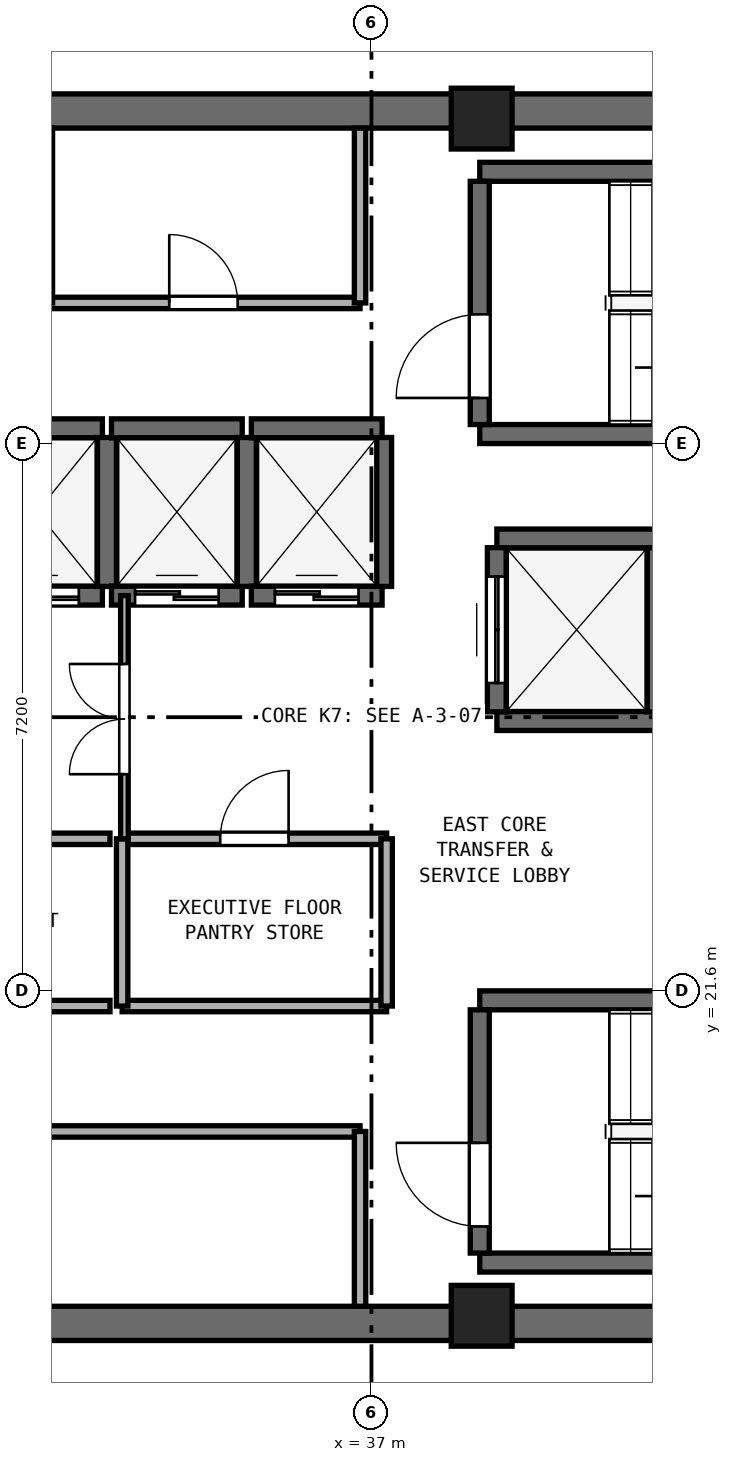
"""IFC4 building model, lengths in metres.
Left out: names, types, materials, properties, quantities, classifications, styles, units other than length and angle.
Written with IfcOpenShell. Run it as: python <this file> out.ifc"""

import sys

from ifc_helpers import new_model, si_unit, direction, frame, frame_2d, origin, origin_2d, place, context, subcontext, project, spatial, rectangle, extrude, element, fill, save


model = new_model("IFC4")
c1 = context("Model", 3, precision=1e-05, world=origin(), true_north=direction((0.0, 1.0)))
c2 = subcontext(c1, "Body", "Model", "MODEL_VIEW")
j1 = project(units=[si_unit("LENGTHUNIT", "METRE"), si_unit("PLANEANGLEUNIT", "RADIAN")], contexts=[c1])
p1 = place(None, origin())
s1 = spatial("IfcSite", under=j1, at=p1, CompositionType="ELEMENT")
p2 = place(p1, origin())
s2 = spatial("IfcBuilding", under=s1, at=p2, CompositionType="ELEMENT")
p3 = place(p2, frame((0.0, 0.0, 247.8)))
s3 = spatial("IfcBuildingStorey", under=s2, at=p3, CompositionType="ELEMENT", Elevation=247.8)
for number, where, z_axis, x_axis in (
    (1, (25.4, 17.225, 0.0), (0.0, 0.0, 1.0), (1.0, 0.0, 0.0)),
    (2, (25.4, 33.175, 0.0), (0.0, 0.0, 1.0), (1.0, 0.0, 0.0)),
):
    element("IfcWall", number, at=place(p3, frame(where, z_axis=z_axis, x_axis=x_axis)), inside=s3, PredefinedType="SHEAR", context=c2, shape_type="SweptSolid", body=[
        extrude(rectangle(XDim=23.2, YDim=0.45, at=frame_2d((11.6, 0.0))), origin(), (0.0, 0.0, 1.0), 3.51),
    ])
for number, where, z_axis, x_axis in (
    (3, (38.45, 17.325, 0.0), (0.0, 0.0, 1.0), (1.0, 0.0, 0.0)),
    (4, (38.45, 33.075, 0.0), (0.0, 0.0, 1.0), (1.0, 0.0, 0.0)),
):
    element("IfcColumn", number, at=place(p3, frame(where, z_axis=z_axis, x_axis=x_axis)), inside=s3, PredefinedType="PILASTER", context=c2, shape_type="SweptSolid", body=[
        extrude(rectangle(XDim=0.8, YDim=0.8, at=origin_2d()), origin(), (0.0, 0.0, 1.0), 3.8),
    ])
for number, where, z_axis, x_axis in (
    (5, (38.425, 28.925, 0.0), (0.0, 0.0, 1.0), (1.0, 0.0, 0.0)),
    (6, (38.425, 32.375, 0.0), (0.0, 0.0, 1.0), (1.0, 0.0, 0.0)),
):
    element("IfcWall", number, at=place(p3, frame(where, z_axis=z_axis, x_axis=x_axis)), inside=s3, PredefinedType="SHEAR", context=c2, shape_type="SweptSolid", body=[
        extrude(rectangle(XDim=7.3, YDim=0.25, at=frame_2d((3.65, 0.0))), origin(), (0.0, 0.0, 1.0), 3.51),
    ])
p4 = place(p3, frame((38.425, 29.05, 0.0), z_axis=(0.0, 0.0, 1.0), x_axis=(0.0, 1.0, 0.0)))
e7 = element("IfcWall", 7, at=p4, inside=s3, PredefinedType="SHEAR", context=c2, shape_type="SweptSolid", body=[
    extrude(rectangle(XDim=3.2, YDim=0.25, at=frame_2d((1.6, 0.0))), origin(), (0.0, 0.0, 1.0), 3.51),
])
p5 = place(p4, frame((0.35, 0.0, 0.0)))
e8 = element("IfcOpeningElement", 8, at=p5, cuts=e7, PredefinedType="OPENING", context=c2, shape_type="SweptSolid", body=[
    extrude(rectangle(XDim=1.1, YDim=2.15, at=frame_2d((0.55, 1.075))), frame((0.0, 0.135, 0.0), z_axis=(0.0, -1.0, 0.0), x_axis=(1.0, 0.0, 0.0)), (0.0, 0.0, 1.0), 0.27),
])
for number, where, z_axis, x_axis in (
    (9, (38.425, 18.025, 0.0), (0.0, 0.0, 1.0), (1.0, 0.0, 0.0)),
    (10, (38.425, 21.475, 0.0), (0.0, 0.0, 1.0), (1.0, 0.0, 0.0)),
):
    element("IfcWall", number, at=place(p3, frame(where, z_axis=z_axis, x_axis=x_axis)), inside=s3, PredefinedType="SHEAR", context=c2, shape_type="SweptSolid", body=[
        extrude(rectangle(XDim=7.3, YDim=0.25, at=frame_2d((3.65, 0.0))), origin(), (0.0, 0.0, 1.0), 3.51),
    ])
p6 = place(p3, frame((38.425, 18.15, 0.0), z_axis=(0.0, 0.0, 1.0), x_axis=(0.0, 1.0, 0.0)))
e11 = element("IfcWall", 11, at=p6, inside=s3, PredefinedType="SHEAR", context=c2, shape_type="SweptSolid", body=[
    extrude(rectangle(XDim=3.2, YDim=0.25, at=frame_2d((1.6, 0.0))), origin(), (0.0, 0.0, 1.0), 3.51),
])
p7 = place(p6, frame((0.35, 0.0, 0.0)))
e12 = element("IfcOpeningElement", 12, at=p7, cuts=e11, PredefinedType="OPENING", context=c2, shape_type="SweptSolid", body=[
    extrude(rectangle(XDim=1.1, YDim=2.15, at=frame_2d((0.55, 1.075))), frame((0.0, 0.135, 0.0), z_axis=(0.0, -1.0, 0.0), x_axis=(1.0, 0.0, 0.0)), (0.0, 0.0, 1.0), 0.27),
])
p8 = place(p3, frame((31.74, 26.8, 0.0), z_axis=(0.0, 0.0, 1.0), x_axis=(1.0, 0.0, 0.0)))
e13 = element("IfcWall", 13, at=p8, inside=s3, PredefinedType="SHEAR", context=c2, shape_type="SweptSolid", body=[
    extrude(rectangle(XDim=1.72, YDim=0.25, at=frame_2d((0.86, 0.0))), origin(), (0.0, 0.0, 1.0), 3.51),
])
p9 = place(p8, frame((0.31, 0.0, 0.0)))
e14 = element("IfcOpeningElement", 14, at=p9, cuts=e13, PredefinedType="OPENING", context=c2, shape_type="SweptSolid", body=[
    extrude(rectangle(XDim=1.1, YDim=2.15, at=frame_2d((0.55, 1.075))), frame((0.0, 0.135, 0.0), z_axis=(0.0, -1.0, 0.0), x_axis=(1.0, 0.0, 0.0)), (0.0, 0.0, 1.0), 0.27),
])
p10 = place(p3, frame((31.74, 29.0, 0.0), z_axis=(0.0, 0.0, 1.0), x_axis=(1.0, 0.0, 0.0)))
e15 = element("IfcWall", 15, at=p10, inside=s3, PredefinedType="SHEAR", context=c2, shape_type="SweptSolid", body=[
    extrude(rectangle(XDim=1.72, YDim=0.25, at=frame_2d((0.86, 0.0))), origin(), (0.0, 0.0, 1.0), 3.51),
])
p11 = place(p3, frame((33.52, 26.92, 0.0), z_axis=(0.0, 0.0, 1.0), x_axis=(0.0, 1.0, 0.0)))
e16 = element("IfcWall", 16, at=p11, inside=s3, PredefinedType="SHEAR", context=c2, shape_type="SweptSolid", body=[
    extrude(rectangle(XDim=1.96, YDim=0.25, at=frame_2d((0.98, 0.0))), origin(), (0.0, 0.0, 1.0), 3.51),
])
p12 = place(p3, frame((33.58, 26.8, 0.0), z_axis=(0.0, 0.0, 1.0), x_axis=(1.0, 0.0, 0.0)))
e17 = element("IfcWall", 17, at=p12, inside=s3, PredefinedType="SHEAR", context=c2, shape_type="SweptSolid", body=[
    extrude(rectangle(XDim=1.72, YDim=0.25, at=frame_2d((0.86, 0.0))), origin(), (0.0, 0.0, 1.0), 3.51),
])
p13 = place(p12, frame((0.31, 0.0, 0.0)))
e18 = element("IfcOpeningElement", 18, at=p13, cuts=e17, PredefinedType="OPENING", context=c2, shape_type="SweptSolid", body=[
    extrude(rectangle(XDim=1.1, YDim=2.15, at=frame_2d((0.55, 1.075))), frame((0.0, 0.135, 0.0), z_axis=(0.0, -1.0, 0.0), x_axis=(1.0, 0.0, 0.0)), (0.0, 0.0, 1.0), 0.27),
])
p14 = place(p3, frame((33.58, 29.0, 0.0), z_axis=(0.0, 0.0, 1.0), x_axis=(1.0, 0.0, 0.0)))
e19 = element("IfcWall", 19, at=p14, inside=s3, PredefinedType="SHEAR", context=c2, shape_type="SweptSolid", body=[
    extrude(rectangle(XDim=1.72, YDim=0.25, at=frame_2d((0.86, 0.0))), origin(), (0.0, 0.0, 1.0), 3.51),
])
p15 = place(p3, frame((35.36, 26.92, 0.0), z_axis=(0.0, 0.0, 1.0), x_axis=(0.0, 1.0, 0.0)))
e20 = element("IfcWall", 20, at=p15, inside=s3, PredefinedType="SHEAR", context=c2, shape_type="SweptSolid", body=[
    extrude(rectangle(XDim=1.96, YDim=0.25, at=frame_2d((0.98, 0.0))), origin(), (0.0, 0.0, 1.0), 3.51),
])
p16 = place(p3, frame((35.42, 26.8, 0.0), z_axis=(0.0, 0.0, 1.0), x_axis=(1.0, 0.0, 0.0)))
e21 = element("IfcWall", 21, at=p16, inside=s3, PredefinedType="SHEAR", context=c2, shape_type="SweptSolid", body=[
    extrude(rectangle(XDim=1.72, YDim=0.25, at=frame_2d((0.86, 0.0))), origin(), (0.0, 0.0, 1.0), 3.51),
])
p17 = place(p16, frame((0.31, 0.0, 0.0)))
e22 = element("IfcOpeningElement", 22, at=p17, cuts=e21, PredefinedType="OPENING", context=c2, shape_type="SweptSolid", body=[
    extrude(rectangle(XDim=1.1, YDim=2.15, at=frame_2d((0.55, 1.075))), frame((0.0, 0.135, 0.0), z_axis=(0.0, -1.0, 0.0), x_axis=(1.0, 0.0, 0.0)), (0.0, 0.0, 1.0), 0.27),
])
p18 = place(p3, frame((35.42, 29.0, 0.0), z_axis=(0.0, 0.0, 1.0), x_axis=(1.0, 0.0, 0.0)))
e23 = element("IfcWall", 23, at=p18, inside=s3, PredefinedType="SHEAR", context=c2, shape_type="SweptSolid", body=[
    extrude(rectangle(XDim=1.72, YDim=0.25, at=frame_2d((0.86, 0.0))), origin(), (0.0, 0.0, 1.0), 3.51),
])
p19 = place(p3, frame((37.14, 26.92, 0.0), z_axis=(0.0, 0.0, 1.0), x_axis=(0.0, 1.0, 0.0)))
e24 = element("IfcWall", 24, at=p19, inside=s3, PredefinedType="SHEAR", context=c2, shape_type="SweptSolid", body=[
    extrude(rectangle(XDim=1.96, YDim=0.25, at=frame_2d((0.98, 0.0))), origin(), (0.0, 0.0, 1.0), 3.51),
])
for number, where, z_axis, x_axis in (
    (25, (38.65, 25.15, 0.0), (0.0, 0.0, 1.0), (1.0, 0.0, 0.0)),
    (26, (38.65, 27.55, 0.0), (0.0, 0.0, 1.0), (1.0, 0.0, 0.0)),
):
    element("IfcWall", number, at=place(p3, frame(where, z_axis=z_axis, x_axis=x_axis)), inside=s3, PredefinedType="SHEAR", context=c2, shape_type="SweptSolid", body=[
        extrude(rectangle(XDim=2.1, YDim=0.25, at=frame_2d((1.05, 0.0))), origin(), (0.0, 0.0, 1.0), 3.51),
    ])
p20 = place(p3, frame((38.65, 25.27, 0.0), z_axis=(0.0, 0.0, 1.0), x_axis=(0.0, 1.0, 0.0)))
e27 = element("IfcWall", 27, at=p20, inside=s3, PredefinedType="SHEAR", context=c2, shape_type="SweptSolid", body=[
    extrude(rectangle(XDim=2.16, YDim=0.25, at=frame_2d((1.08, 0.0))), origin(), (0.0, 0.0, 1.0), 3.51),
])
p21 = place(p20, frame((0.38, 0.0, 0.0)))
e28 = element("IfcOpeningElement", 28, at=p21, cuts=e27, PredefinedType="OPENING", context=c2, shape_type="SweptSolid", body=[
    extrude(rectangle(XDim=1.4, YDim=2.2, at=frame_2d((0.7, 1.1))), frame((0.0, 0.135, 0.0), z_axis=(0.0, -1.0, 0.0), x_axis=(1.0, 0.0, 0.0)), (0.0, 0.0, 1.0), 0.27),
])
p22 = place(p3, frame((40.75, 25.27, 0.0), z_axis=(0.0, 0.0, 1.0), x_axis=(0.0, 1.0, 0.0)))
e29 = element("IfcWall", 29, at=p22, inside=s3, PredefinedType="SHEAR", context=c2, shape_type="SweptSolid", body=[
    extrude(rectangle(XDim=2.16, YDim=0.25, at=frame_2d((1.08, 0.0))), origin(), (0.0, 0.0, 1.0), 3.51),
])
p23 = place(p3, frame((32.73, 30.65, 0.0), z_axis=(0.0, 0.0, 1.0), x_axis=(1.0, 0.0, 0.0)))
e30 = element("IfcWall", 30, at=p23, inside=s3, PredefinedType="PARTITIONING", context=c2, shape_type="SweptSolid", body=[
    extrude(rectangle(XDim=4.12, YDim=0.15, at=frame_2d((2.06, 0.0))), origin(), (0.0, 0.0, 1.0), 3.51),
])
p24 = place(p23, frame((1.61, 0.0, 0.0)))
e31 = element("IfcOpeningElement", 31, at=p24, cuts=e30, PredefinedType="OPENING", context=c2, shape_type="SweptSolid", body=[
    extrude(rectangle(XDim=0.9, YDim=2.1, at=frame_2d((0.45, 1.05))), frame((0.0, 0.085, 0.0), z_axis=(0.0, -1.0, 0.0), x_axis=(1.0, 0.0, 0.0)), (0.0, 0.0, 1.0), 0.17),
])
for number, where, z_axis, x_axis in (
    (32, (32.73, 30.65, 0.0), (0.0, 0.0, 1.0), (0.0, 1.0, 0.0)),
    (33, (36.85, 30.65, 0.0), (0.0, 0.0, 1.0), (0.0, 1.0, 0.0)),
):
    element("IfcWall", number, at=place(p3, frame(where, z_axis=z_axis, x_axis=x_axis)), inside=s3, PredefinedType="PARTITIONING", context=c2, shape_type="SweptSolid", body=[
        extrude(rectangle(XDim=2.3, YDim=0.15, at=frame_2d((1.15, 0.0))), origin(), (0.0, 0.0, 1.0), 3.51),
    ])
p25 = place(p3, frame((25.97, 19.75, 0.0), z_axis=(0.0, 0.0, 1.0), x_axis=(1.0, 0.0, 0.0)))
e34 = element("IfcWall", 34, at=p25, inside=s3, PredefinedType="PARTITIONING", context=c2, shape_type="SweptSolid", body=[
    extrude(rectangle(XDim=10.88, YDim=0.15, at=frame_2d((5.44, 0.0))), origin(), (0.0, 0.0, 1.0), 3.51),
])
p26 = place(p25, frame((4.965, 0.0, 0.0)))
e35 = element("IfcOpeningElement", 35, at=p26, cuts=e34, PredefinedType="OPENING", context=c2, shape_type="SweptSolid", body=[
    extrude(rectangle(XDim=0.95, YDim=2.1, at=frame_2d((0.475, 1.05))), frame((0.0, 0.085, 0.0), z_axis=(0.0, -1.0, 0.0), x_axis=(1.0, 0.0, 0.0)), (0.0, 0.0, 1.0), 0.17),
])
p27 = place(p3, frame((36.85, 17.45, 0.0), z_axis=(0.0, 0.0, 1.0), x_axis=(0.0, 1.0, 0.0)))
e36 = element("IfcWall", 36, at=p27, inside=s3, PredefinedType="PARTITIONING", context=c2, shape_type="SweptSolid", body=[
    extrude(rectangle(XDim=2.3, YDim=0.15, at=frame_2d((1.15, 0.0))), origin(), (0.0, 0.0, 1.0), 3.51),
])
p28 = place(p3, frame((30.08, 21.4, 0.0), z_axis=(0.0, 0.0, 1.0), x_axis=(1.0, 0.0, 0.0)))
e37 = element("IfcWall", 37, at=p28, inside=s3, PredefinedType="PARTITIONING", context=c2, shape_type="SweptSolid", body=[
    extrude(rectangle(XDim=3.48, YDim=0.15, at=frame_2d((1.74, 0.0))), origin(), (0.0, 0.0, 1.0), 3.51),
])
p29 = place(p3, frame((30.08, 23.6, 0.0), z_axis=(0.0, 0.0, 1.0), x_axis=(1.0, 0.0, 0.0)))
e38 = element("IfcWall", 38, at=p29, inside=s3, PredefinedType="PARTITIONING", context=c2, shape_type="SweptSolid", body=[
    extrude(rectangle(XDim=3.48, YDim=0.15, at=frame_2d((1.74, 0.0))), origin(), (0.0, 0.0, 1.0), 3.51),
])
p30 = place(p29, frame((1.29, 0.0, 0.0)))
e39 = element("IfcOpeningElement", 39, at=p30, cuts=e38, PredefinedType="OPENING", context=c2, shape_type="SweptSolid", body=[
    extrude(rectangle(XDim=0.9, YDim=2.1, at=frame_2d((0.45, 1.05))), frame((0.0, 0.085, 0.0), z_axis=(0.0, -1.0, 0.0), x_axis=(1.0, 0.0, 0.0)), (0.0, 0.0, 1.0), 0.17),
])
p31 = place(p3, frame((33.72, 21.4, 0.0), z_axis=(0.0, 0.0, 1.0), x_axis=(1.0, 0.0, 0.0)))
e40 = element("IfcWall", 40, at=p31, inside=s3, PredefinedType="PARTITIONING", context=c2, shape_type="SweptSolid", body=[
    extrude(rectangle(XDim=3.48, YDim=0.15, at=frame_2d((1.74, 0.0))), origin(), (0.0, 0.0, 1.0), 3.51),
])
p32 = place(p3, frame((33.72, 23.6, 0.0), z_axis=(0.0, 0.0, 1.0), x_axis=(1.0, 0.0, 0.0)))
e41 = element("IfcWall", 41, at=p32, inside=s3, PredefinedType="PARTITIONING", context=c2, shape_type="SweptSolid", body=[
    extrude(rectangle(XDim=3.48, YDim=0.15, at=frame_2d((1.74, 0.0))), origin(), (0.0, 0.0, 1.0), 3.51),
])
p33 = place(p32, frame((1.29, 0.0, 0.0)))
e42 = element("IfcOpeningElement", 42, at=p33, cuts=e41, PredefinedType="OPENING", context=c2, shape_type="SweptSolid", body=[
    extrude(rectangle(XDim=0.9, YDim=2.1, at=frame_2d((0.45, 1.05))), frame((0.0, 0.085, 0.0), z_axis=(0.0, -1.0, 0.0), x_axis=(1.0, 0.0, 0.0)), (0.0, 0.0, 1.0), 0.17),
])
for number, where, z_axis, x_axis in (
    (43, (33.72, 21.4, 0.0), (0.0, 0.0, 1.0), (0.0, 1.0, 0.0)),
    (44, (37.2, 21.4, 0.0), (0.0, 0.0, 1.0), (0.0, 1.0, 0.0)),
):
    element("IfcWall", number, at=place(p3, frame(where, z_axis=z_axis, x_axis=x_axis)), inside=s3, PredefinedType="PARTITIONING", context=c2, shape_type="SweptSolid", body=[
        extrude(rectangle(XDim=2.2, YDim=0.15, at=frame_2d((1.1, 0.0))), origin(), (0.0, 0.0, 1.0), 3.51),
    ])
p34 = place(p3, frame((33.75, 23.6, 0.0), z_axis=(0.0, 0.0, 1.0), x_axis=(0.0, 1.0, 0.0)))
e45 = element("IfcWall", 45, at=p34, inside=s3, PredefinedType="PARTITIONING", context=c2, shape_type="SweptSolid", body=[
    extrude(rectangle(XDim=3.2, YDim=0.1, at=frame_2d((1.6, 0.0))), origin(), (0.0, 0.0, 1.0), 3.51),
])
p35 = place(p34, frame((0.85, 0.0, 0.0)))
e46 = element("IfcOpeningElement", 46, at=p35, cuts=e45, PredefinedType="OPENING", context=c2, shape_type="SweptSolid", body=[
    extrude(rectangle(XDim=1.45, YDim=2.12, at=frame_2d((0.725, 1.06))), frame((0.0, 0.06, 0.0), z_axis=(0.0, -1.0, 0.0), x_axis=(1.0, 0.0, 0.0)), (0.0, 0.0, 1.0), 0.12),
])
p36 = place(p5, origin())
e47 = element("IfcDoor", 47, at=p36, inside=s3, OperationType="SINGLE_SWING_LEFT", PredefinedType="DOOR", context=c2, shape_type="SweptSolid", body=[
    extrude(rectangle(XDim=1.1, YDim=2.15, at=frame_2d((0.55, 1.075))), frame((0.0, 0.025, 0.0), z_axis=(0.0, -1.0, 0.0), x_axis=(1.0, 0.0, 0.0)), (0.0, 0.0, 1.0), 0.05),
])
fill(e8, e47)
p37 = place(p7, origin())
e48 = element("IfcDoor", 48, at=p37, inside=s3, OperationType="SINGLE_SWING_RIGHT", PredefinedType="DOOR", context=c2, shape_type="SweptSolid", body=[
    extrude(rectangle(XDim=1.1, YDim=2.15, at=frame_2d((0.55, 1.075))), frame((0.0, 0.025, 0.0), z_axis=(0.0, -1.0, 0.0), x_axis=(1.0, 0.0, 0.0)), (0.0, 0.0, 1.0), 0.05),
])
fill(e12, e48)
p38 = place(p9, origin())
e49 = element("IfcDoor", 49, at=p38, inside=s3, OperationType="DOUBLE_DOOR_SLIDING", PredefinedType="DOOR", context=c2, shape_type="SweptSolid", body=[
    extrude(rectangle(XDim=1.1, YDim=2.15, at=frame_2d((0.55, 1.075))), frame((0.0, 0.025, 0.0), z_axis=(0.0, -1.0, 0.0), x_axis=(1.0, 0.0, 0.0)), (0.0, 0.0, 1.0), 0.05),
])
fill(e14, e49)
p39 = place(p13, origin())
e50 = element("IfcDoor", 50, at=p39, inside=s3, OperationType="DOUBLE_DOOR_SLIDING", PredefinedType="DOOR", context=c2, shape_type="SweptSolid", body=[
    extrude(rectangle(XDim=1.1, YDim=2.15, at=frame_2d((0.55, 1.075))), frame((0.0, 0.025, 0.0), z_axis=(0.0, -1.0, 0.0), x_axis=(1.0, 0.0, 0.0)), (0.0, 0.0, 1.0), 0.05),
])
fill(e18, e50)
p40 = place(p17, origin())
e51 = element("IfcDoor", 51, at=p40, inside=s3, OperationType="DOUBLE_DOOR_SLIDING", PredefinedType="DOOR", context=c2, shape_type="SweptSolid", body=[
    extrude(rectangle(XDim=1.1, YDim=2.15, at=frame_2d((0.55, 1.075))), frame((0.0, 0.025, 0.0), z_axis=(0.0, -1.0, 0.0), x_axis=(1.0, 0.0, 0.0)), (0.0, 0.0, 1.0), 0.05),
])
fill(e22, e51)
p41 = place(p21, origin())
e52 = element("IfcDoor", 52, at=p41, inside=s3, OperationType="DOUBLE_DOOR_SLIDING", PredefinedType="DOOR", context=c2, shape_type="SweptSolid", body=[
    extrude(rectangle(XDim=1.4, YDim=2.2, at=frame_2d((0.7, 1.1))), frame((0.0, 0.025, 0.0), z_axis=(0.0, -1.0, 0.0), x_axis=(1.0, 0.0, 0.0)), (0.0, 0.0, 1.0), 0.05),
])
fill(e28, e52)
p42 = place(p24, origin())
e53 = element("IfcDoor", 53, at=p42, inside=s3, OperationType="SINGLE_SWING_LEFT", PredefinedType="DOOR", context=c2, shape_type="SweptSolid", body=[
    extrude(rectangle(XDim=0.9, YDim=2.1, at=frame_2d((0.45, 1.05))), frame((0.0, 0.025, 0.0), z_axis=(0.0, -1.0, 0.0), x_axis=(1.0, 0.0, 0.0)), (0.0, 0.0, 1.0), 0.05),
])
fill(e31, e53)
p43 = place(p33, origin())
e54 = element("IfcDoor", 54, at=p43, inside=s3, OperationType="SINGLE_SWING_RIGHT", PredefinedType="DOOR", context=c2, shape_type="SweptSolid", body=[
    extrude(rectangle(XDim=0.9, YDim=2.1, at=frame_2d((0.45, 1.05))), frame((0.0, 0.025, 0.0), z_axis=(0.0, -1.0, 0.0), x_axis=(1.0, 0.0, 0.0)), (0.0, 0.0, 1.0), 0.05),
])
fill(e42, e54)
p44 = place(p35, origin())
e55 = element("IfcDoor", 55, at=p44, inside=s3, OperationType="DOUBLE_DOOR_SINGLE_SWING", PredefinedType="DOOR", context=c2, shape_type="SweptSolid", body=[
    extrude(rectangle(XDim=1.45, YDim=2.12, at=frame_2d((0.725, 1.06))), frame((0.0, 0.025, 0.0), z_axis=(0.0, -1.0, 0.0), x_axis=(1.0, 0.0, 0.0)), (0.0, 0.0, 1.0), 0.05),
])
fill(e46, e55)
save(model, sys.argv[1])
